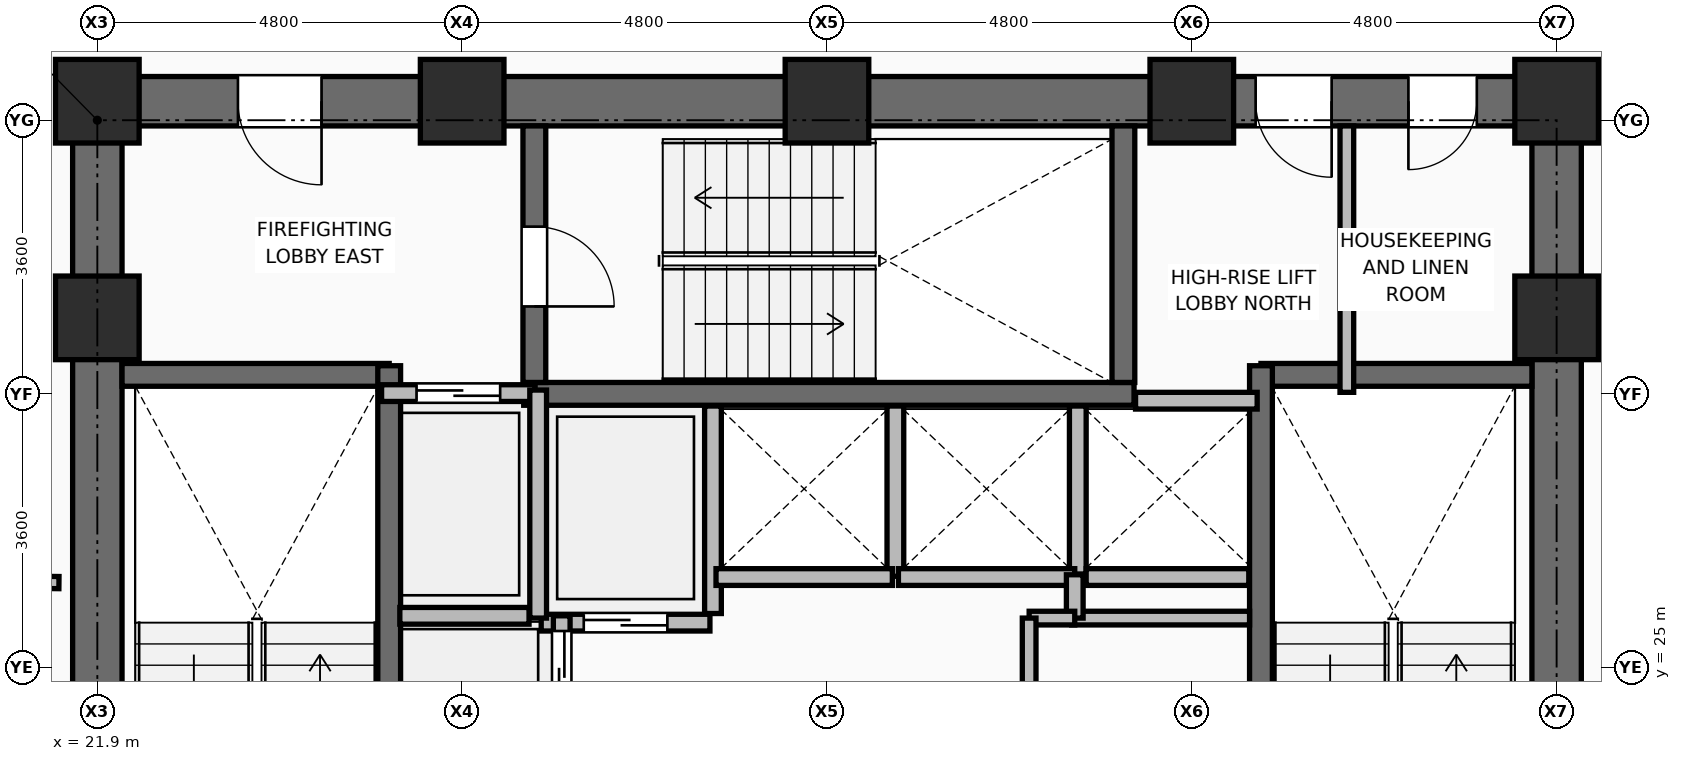
"""IFC4 building model, lengths in metres.
Left out: names, types, materials, properties, quantities, classifications, styles, units other than length and angle.
Written with IfcOpenShell. Run it as: python <this file> out.ifc"""

import sys

from ifc_helpers import new_model, si_unit, direction, frame, frame_2d, origin, origin_2d, place, context, subcontext, project, spatial, rectangle, extrude, element, fill, save


model = new_model("IFC4")
c1 = context("Model", 3, precision=1e-05, world=origin(), true_north=direction((0.0, 1.0)))
c2 = subcontext(c1, "Body", "Model", "MODEL_VIEW")
j1 = project(units=[si_unit("LENGTHUNIT", "METRE"), si_unit("PLANEANGLEUNIT", "RADIAN")], contexts=[c1])
p1 = place(None, origin())
s1 = spatial("IfcSite", under=j1, at=p1, CompositionType="ELEMENT")
p2 = place(p1, origin())
s2 = spatial("IfcBuilding", under=s1, at=p2, CompositionType="ELEMENT")
p3 = place(p2, frame((0.0, 0.0, 72.0)))
s3 = spatial("IfcBuildingStorey", under=s2, at=p3, CompositionType="ELEMENT", Elevation=72.0)
for number, where, z_axis, x_axis in (
    (1, (21.9, 29.6, 0.0), (0.0, 0.0, 1.0), (1.0, 0.0, 0.0)),
    (2, (41.1, 29.6, 0.0), (0.0, 0.0, 1.0), (1.0, 0.0, 0.0)),
    (3, (21.9, 32.45, 0.0), (0.0, 0.0, 1.0), (1.0, 0.0, 0.0)),
    (4, (26.7, 32.45, 0.0), (0.0, 0.0, 1.0), (1.0, 0.0, 0.0)),
    (5, (31.5, 32.45, 0.0), (0.0, 0.0, 1.0), (1.0, 0.0, 0.0)),
    (6, (36.3, 32.45, 0.0), (0.0, 0.0, 1.0), (1.0, 0.0, 0.0)),
    (7, (41.1, 32.45, 0.0), (0.0, 0.0, 1.0), (1.0, 0.0, 0.0)),
):
    element("IfcColumn", number, at=place(p3, frame(where, z_axis=z_axis, x_axis=x_axis)), inside=s3, PredefinedType="COLUMN", context=c2, shape_type="SweptSolid", body=[
        extrude(rectangle(XDim=1.1, YDim=1.1, at=origin_2d()), origin(), (0.0, 0.0, 1.0), 3.75),
    ])
p4 = place(p3, frame((30.0, 25.71, 0.0), z_axis=(0.0, 0.0, 1.0), x_axis=(0.0, 1.0, 0.0)))
e8 = element("IfcWall", 8, at=p4, inside=s3, PredefinedType="PARTITIONING", context=c2, shape_type="SweptSolid", body=[
    extrude(rectangle(XDim=2.73, YDim=0.22, at=frame_2d((1.365, 0.0))), origin(), (0.0, 0.0, 1.0), 3.545),
])
p5 = place(p3, frame((32.4, 26.2, 0.0), z_axis=(0.0, 0.0, 1.0), x_axis=(0.0, 1.0, 0.0)))
e9 = element("IfcWall", 9, at=p5, inside=s3, PredefinedType="PARTITIONING", context=c2, shape_type="SweptSolid", body=[
    extrude(rectangle(XDim=2.24, YDim=0.22, at=frame_2d((1.12, 0.0))), origin(), (0.0, 0.0, 1.0), 3.545),
])
p6 = place(p3, frame((34.8, 26.23, 0.0), z_axis=(0.0, 0.0, 1.0), x_axis=(0.0, 1.0, 0.0)))
e10 = element("IfcWall", 10, at=p6, inside=s3, PredefinedType="PARTITIONING", context=c2, shape_type="SweptSolid", body=[
    extrude(rectangle(XDim=2.21, YDim=0.22, at=frame_2d((1.105, 0.0))), origin(), (0.0, 0.0, 1.0), 3.545),
])
p7 = place(p3, frame((34.91, 26.19, 0.0), z_axis=(0.0, 0.0, 1.0), x_axis=(1.0, 0.0, 0.0)))
e11 = element("IfcWall", 11, at=p7, inside=s3, PredefinedType="PARTITIONING", context=c2, shape_type="SweptSolid", body=[
    extrude(rectangle(XDim=2.14, YDim=0.22, at=frame_2d((1.07, 0.0))), origin(), (0.0, 0.0, 1.0), 3.545),
])
p8 = place(p3, frame((21.575, 32.45, 0.0), z_axis=(0.0, 0.0, 1.0), x_axis=(1.0, 0.0, 0.0)))
e12 = element("IfcWall", 12, at=p8, inside=s3, PredefinedType="SHEAR", context=c2, shape_type="SweptSolid", body=[
    extrude(rectangle(XDim=19.85, YDim=0.65, at=frame_2d((9.925, 0.0))), origin(), (0.0, 0.0, 1.0), 3.57),
])
p9 = place(p8, frame((2.175, 0.0, 0.0)))
e13 = element("IfcOpeningElement", 13, at=p9, cuts=e12, PredefinedType="OPENING", context=c2, shape_type="SweptSolid", body=[
    extrude(rectangle(XDim=1.1, YDim=2.1, at=frame_2d((0.55, 1.05))), frame((0.0, 0.335, 0.0), z_axis=(0.0, -1.0, 0.0), x_axis=(1.0, 0.0, 0.0)), (0.0, 0.0, 1.0), 0.67),
])
p10 = place(p8, frame((15.565, 0.0, 0.0)))
e14 = element("IfcOpeningElement", 14, at=p10, cuts=e12, PredefinedType="OPENING", context=c2, shape_type="SweptSolid", body=[
    extrude(rectangle(XDim=1.0, YDim=2.1, at=frame_2d((0.5, 1.05))), frame((0.0, 0.335, 0.0), z_axis=(0.0, -1.0, 0.0), x_axis=(1.0, 0.0, 0.0)), (0.0, 0.0, 1.0), 0.67),
])
p11 = place(p8, frame((17.575, 0.0, 0.0)))
e15 = element("IfcOpeningElement", 15, at=p11, cuts=e12, PredefinedType="OPENING", context=c2, shape_type="SweptSolid", body=[
    extrude(rectangle(XDim=0.9, YDim=2.1, at=frame_2d((0.45, 1.05))), frame((0.0, 0.335, 0.0), z_axis=(0.0, -1.0, 0.0), x_axis=(1.0, 0.0, 0.0)), (0.0, 0.0, 1.0), 0.67),
])
p12 = place(p3, frame((21.9, 18.125, 0.0), z_axis=(0.0, 0.0, 1.0), x_axis=(0.0, 1.0, 0.0)))
e16 = element("IfcWall", 16, at=p12, inside=s3, PredefinedType="SHEAR", context=c2, shape_type="SweptSolid", body=[
    extrude(rectangle(XDim=14.0, YDim=0.65, at=frame_2d((7.0, 0.0))), origin(), (0.0, 0.0, 1.0), 3.57),
])
p13 = place(p3, frame((41.1, 18.125, 0.0), z_axis=(0.0, 0.0, 1.0), x_axis=(0.0, 1.0, 0.0)))
e17 = element("IfcWall", 17, at=p13, inside=s3, PredefinedType="SHEAR", context=c2, shape_type="SweptSolid", body=[
    extrude(rectangle(XDim=14.0, YDim=0.65, at=frame_2d((7.0, 0.0))), origin(), (0.0, 0.0, 1.0), 3.57),
])
p14 = place(p13, frame((3.335, 0.0, 0.0)))
e18 = element("IfcOpeningElement", 18, at=p14, cuts=e17, PredefinedType="OPENING", context=c2, shape_type="SweptSolid", body=[
    extrude(rectangle(XDim=1.05, YDim=2.1, at=frame_2d((0.525, 1.05))), frame((0.0, 0.335, 0.0), z_axis=(0.0, -1.0, 0.0), x_axis=(1.0, 0.0, 0.0)), (0.0, 0.0, 1.0), 0.67),
])
p15 = place(p3, frame((22.225, 28.85, 0.0), z_axis=(0.0, 0.0, 1.0), x_axis=(1.0, 0.0, 0.0)))
e19 = element("IfcWall", 19, at=p15, inside=s3, PredefinedType="SHEAR", context=c2, shape_type="SweptSolid", body=[
    extrude(rectangle(XDim=3.515, YDim=0.3, at=frame_2d((1.757, 0.0))), origin(), (0.0, 0.0, 1.0), 3.57),
])
p16 = place(p3, frame((25.74, 20.98, 0.0), z_axis=(0.0, 0.0, 1.0), x_axis=(0.0, 1.0, 0.0)))
e20 = element("IfcWall", 20, at=p16, inside=s3, PredefinedType="SHEAR", context=c2, shape_type="SweptSolid", body=[
    extrude(rectangle(XDim=7.99, YDim=0.3, at=frame_2d((3.995, 0.0))), origin(), (0.0, 0.0, 1.0), 3.57),
])
p17 = place(p3, frame((37.21, 28.85, 0.0), z_axis=(0.0, 0.0, 1.0), x_axis=(1.0, 0.0, 0.0)))
e21 = element("IfcWall", 21, at=p17, inside=s3, PredefinedType="SHEAR", context=c2, shape_type="SweptSolid", body=[
    extrude(rectangle(XDim=3.565, YDim=0.3, at=frame_2d((1.782, 0.0))), origin(), (0.0, 0.0, 1.0), 3.57),
])
p18 = place(p3, frame((37.21, 20.98, 0.0), z_axis=(0.0, 0.0, 1.0), x_axis=(0.0, 1.0, 0.0)))
e22 = element("IfcWall", 22, at=p18, inside=s3, PredefinedType="SHEAR", context=c2, shape_type="SweptSolid", body=[
    extrude(rectangle(XDim=7.99, YDim=0.3, at=frame_2d((3.995, 0.0))), origin(), (0.0, 0.0, 1.0), 3.57),
])
p19 = place(p3, frame((27.51, 28.6, 0.0), z_axis=(0.0, 0.0, 1.0), x_axis=(1.0, 0.0, 0.0)))
e23 = element("IfcWall", 23, at=p19, inside=s3, PredefinedType="SHEAR", context=c2, shape_type="SweptSolid", body=[
    extrude(rectangle(XDim=8.03, YDim=0.3, at=frame_2d((4.015, 0.0))), origin(), (0.0, 0.0, 1.0), 3.57),
])
p20 = place(p3, frame((27.65, 28.75, 0.0), z_axis=(0.0, 0.0, 1.0), x_axis=(0.0, 1.0, 0.0)))
e24 = element("IfcWall", 24, at=p20, inside=s3, PredefinedType="SHEAR", context=c2, shape_type="SweptSolid", body=[
    extrude(rectangle(XDim=3.375, YDim=0.3, at=frame_2d((1.688, 0.0))), origin(), (0.0, 0.0, 1.0), 3.57),
])
p21 = place(p20, frame((1.0, 0.0, 0.0)))
e25 = element("IfcOpeningElement", 25, at=p21, cuts=e24, PredefinedType="OPENING", context=c2, shape_type="SweptSolid", body=[
    extrude(rectangle(XDim=1.05, YDim=2.1, at=frame_2d((0.525, 1.05))), frame((0.0, 0.16, 0.0), z_axis=(0.0, -1.0, 0.0), x_axis=(1.0, 0.0, 0.0)), (0.0, 0.0, 1.0), 0.32),
])
p22 = place(p3, frame((35.4, 28.75, 0.0), z_axis=(0.0, 0.0, 1.0), x_axis=(0.0, 1.0, 0.0)))
e26 = element("IfcWall", 26, at=p22, inside=s3, PredefinedType="SHEAR", context=c2, shape_type="SweptSolid", body=[
    extrude(rectangle(XDim=3.375, YDim=0.3, at=frame_2d((1.688, 0.0))), origin(), (0.0, 0.0, 1.0), 3.57),
])
p23 = place(p3, frame((25.64, 28.61, 0.0), z_axis=(0.0, 0.0, 1.0), x_axis=(1.0, 0.0, 0.0)))
e27 = element("IfcWall", 27, at=p23, inside=s3, PredefinedType="PARTITIONING", context=c2, shape_type="SweptSolid", body=[
    extrude(rectangle(XDim=2.02, YDim=0.22, at=frame_2d((1.01, 0.0))), origin(), (0.0, 0.0, 1.0), 3.55),
])
p24 = place(p23, frame((0.46, 0.0, 0.0)))
e28 = element("IfcOpeningElement", 28, at=p24, cuts=e27, PredefinedType="OPENING", context=c2, shape_type="SweptSolid", body=[
    extrude(rectangle(XDim=1.1, YDim=2.2, at=frame_2d((0.55, 1.1))), frame((0.0, 0.12, 0.0), z_axis=(0.0, -1.0, 0.0), x_axis=(1.0, 0.0, 0.0)), (0.0, 0.0, 1.0), 0.24),
])
p25 = place(p3, frame((27.74, 25.59, 0.0), z_axis=(0.0, 0.0, 1.0), x_axis=(1.0, 0.0, 0.0)))
e29 = element("IfcWall", 29, at=p25, inside=s3, PredefinedType="PARTITIONING", context=c2, shape_type="SweptSolid", body=[
    extrude(rectangle(XDim=2.22, YDim=0.22, at=frame_2d((1.11, 0.0))), origin(), (0.0, 0.0, 1.0), 3.55),
])
p26 = place(p25, frame((0.56, 0.0, 0.0)))
e30 = element("IfcOpeningElement", 30, at=p26, cuts=e29, PredefinedType="OPENING", context=c2, shape_type="SweptSolid", body=[
    extrude(rectangle(XDim=1.1, YDim=2.2, at=frame_2d((0.55, 1.1))), frame((0.0, 0.12, 0.0), z_axis=(0.0, -1.0, 0.0), x_axis=(1.0, 0.0, 0.0)), (0.0, 0.0, 1.0), 0.24),
])
for number, where, z_axis, x_axis in (
    (31, (30.04, 26.19, 0.0), (0.0, 0.0, 1.0), (1.0, 0.0, 0.0)),
    (32, (32.44, 26.19, 0.0), (0.0, 0.0, 1.0), (1.0, 0.0, 0.0)),
):
    element("IfcWall", number, at=place(p3, frame(where, z_axis=z_axis, x_axis=x_axis)), inside=s3, PredefinedType="PARTITIONING", context=c2, shape_type="SweptSolid", body=[
        extrude(rectangle(XDim=2.32, YDim=0.22, at=frame_2d((1.16, 0.0))), origin(), (0.0, 0.0, 1.0), 3.55),
    ])
p27 = place(p3, frame((35.56, 28.51, 0.0), z_axis=(0.0, 0.0, 1.0), x_axis=(1.0, 0.0, 0.0)))
e33 = element("IfcWall", 33, at=p27, inside=s3, PredefinedType="PARTITIONING", context=c2, shape_type="SweptSolid", body=[
    extrude(rectangle(XDim=1.6, YDim=0.22, at=frame_2d((0.8, 0.0))), origin(), (0.0, 0.0, 1.0), 3.55),
])
p28 = place(p3, frame((28.01, 24.18, 0.0), z_axis=(0.0, 0.0, 1.0), x_axis=(0.0, 1.0, 0.0)))
e34 = element("IfcWall", 34, at=p28, inside=s3, PredefinedType="PARTITIONING", context=c2, shape_type="SweptSolid", body=[
    extrude(rectangle(XDim=1.5, YDim=0.22, at=frame_2d((0.75, 0.0))), origin(), (0.0, 0.0, 1.0), 3.55),
])
p29 = place(p28, frame((0.2, 0.0, 0.0)))
e35 = element("IfcOpeningElement", 35, at=p29, cuts=e34, PredefinedType="OPENING", context=c2, shape_type="SweptSolid", body=[
    extrude(rectangle(XDim=1.1, YDim=2.2, at=frame_2d((0.55, 1.1))), frame((0.0, 0.12, 0.0), z_axis=(0.0, -1.0, 0.0), x_axis=(1.0, 0.0, 0.0)), (0.0, 0.0, 1.0), 0.24),
])
p30 = place(p3, frame((27.7, 25.65, 0.0), z_axis=(0.0, 0.0, 1.0), x_axis=(0.0, 1.0, 0.0)))
e36 = element("IfcWall", 36, at=p30, inside=s3, PredefinedType="PARTITIONING", context=c2, shape_type="SweptSolid", body=[
    extrude(rectangle(XDim=3.0, YDim=0.22, at=frame_2d((1.5, 0.0))), origin(), (0.0, 0.0, 1.0), 3.55),
])
p31 = place(p3, frame((25.88, 25.68, 0.0), z_axis=(0.0, 0.0, 1.0), x_axis=(1.0, 0.0, 0.0)))
e37 = element("IfcWall", 37, at=p31, inside=s3, PredefinedType="PARTITIONING", context=c2, shape_type="SweptSolid", body=[
    extrude(rectangle(XDim=1.7, YDim=0.22, at=frame_2d((0.85, 0.0))), origin(), (0.0, 0.0, 1.0), 3.55),
])
p32 = place(p3, frame((34.72, 25.65, 0.0), z_axis=(0.0, 0.0, 1.0), x_axis=(1.0, 0.0, 0.0)))
e38 = element("IfcWall", 38, at=p32, inside=s3, PredefinedType="PARTITIONING", context=c2, shape_type="SweptSolid", body=[
    extrude(rectangle(XDim=2.34, YDim=0.18, at=frame_2d((1.17, 0.0))), origin(), (0.0, 0.0, 1.0), 3.55),
])
p33 = place(p3, frame((34.76, 25.65, 0.0), z_axis=(0.0, 0.0, 1.0), x_axis=(0.0, 1.0, 0.0)))
e39 = element("IfcWall", 39, at=p33, inside=s3, PredefinedType="PARTITIONING", context=c2, shape_type="SweptSolid", body=[
    extrude(rectangle(XDim=0.57, YDim=0.22, at=frame_2d((0.285, 0.0))), origin(), (0.0, 0.0, 1.0), 3.55),
])
p34 = place(p3, frame((34.16, 25.65, 0.0), z_axis=(0.0, 0.0, 1.0), x_axis=(1.0, 0.0, 0.0)))
e40 = element("IfcWall", 40, at=p34, inside=s3, PredefinedType="PARTITIONING", context=c2, shape_type="SweptSolid", body=[
    extrude(rectangle(XDim=0.6, YDim=0.18, at=frame_2d((0.3, 0.0))), origin(), (0.0, 0.0, 1.0), 3.55),
])
p35 = place(p3, frame((34.16, 21.1, 0.0), z_axis=(0.0, 0.0, 1.0), x_axis=(0.0, 1.0, 0.0)))
e41 = element("IfcWall", 41, at=p35, inside=s3, PredefinedType="PARTITIONING", context=c2, shape_type="SweptSolid", body=[
    extrude(rectangle(XDim=4.55, YDim=0.18, at=frame_2d((2.275, 0.0))), origin(), (0.0, 0.0, 1.0), 3.55),
])
p36 = place(p35, frame((1.825, 0.0, 0.0)))
e42 = element("IfcOpeningElement", 42, at=p36, cuts=e41, PredefinedType="OPENING", context=c2, shape_type="SweptSolid", body=[
    extrude(rectangle(XDim=0.9, YDim=2.1, at=frame_2d((0.45, 1.05))), frame((0.0, 0.1, 0.0), z_axis=(0.0, -1.0, 0.0), x_axis=(1.0, 0.0, 0.0)), (0.0, 0.0, 1.0), 0.2),
])
p37 = place(p3, frame((38.34, 28.62, 0.0), z_axis=(0.0, 0.0, 1.0), x_axis=(0.0, 1.0, 0.0)))
e43 = element("IfcWall", 43, at=p37, inside=s3, PredefinedType="PARTITIONING", context=c2, shape_type="SweptSolid", body=[
    extrude(rectangle(XDim=3.505, YDim=0.18, at=frame_2d((1.752, 0.0))), origin(), (0.0, 0.0, 1.0), 3.55),
])
p38 = place(p3, frame((21.395, 26.117, 0.0), z_axis=(0.0, 0.0, 1.0), x_axis=(-0.999934504226, 0.011444966545, 0.0)))
e44 = element("IfcWall", 44, at=p38, inside=s3, PredefinedType="PARTITIONING", context=c2, shape_type="SweptSolid", body=[
    extrude(rectangle(XDim=2.197, YDim=0.16, at=frame_2d((1.099, 0.0))), origin(), (0.0, 0.0, 1.0), 3.55),
])
p39 = place(p21, frame((1.05, 0.0, 0.0), z_axis=(0.0, 0.0, 1.0), x_axis=(-1.0, 0.0, 0.0)))
e45 = element("IfcDoor", 45, at=p39, inside=s3, OperationType="SINGLE_SWING_RIGHT", PredefinedType="DOOR", context=c2, shape_type="SweptSolid", body=[
    extrude(rectangle(XDim=1.05, YDim=2.1, at=frame_2d((0.525, 1.05))), frame((0.0, 0.025, 0.0), z_axis=(0.0, -1.0, 0.0), x_axis=(1.0, 0.0, 0.0)), (0.0, 0.0, 1.0), 0.05),
])
fill(e25, e45)
p40 = place(p24, origin())
e46 = element("IfcDoor", 46, at=p40, inside=s3, OperationType="DOUBLE_DOOR_SLIDING", PredefinedType="DOOR", context=c2, shape_type="SweptSolid", body=[
    extrude(rectangle(XDim=1.1, YDim=2.2, at=frame_2d((0.55, 1.1))), frame((0.0, 0.025, 0.0), z_axis=(0.0, -1.0, 0.0), x_axis=(1.0, 0.0, 0.0)), (0.0, 0.0, 1.0), 0.05),
])
fill(e28, e46)
p41 = place(p26, frame((1.1, 0.0, 0.0), z_axis=(0.0, 0.0, 1.0), x_axis=(-1.0, 0.0, 0.0)))
e47 = element("IfcDoor", 47, at=p41, inside=s3, OperationType="DOUBLE_DOOR_SLIDING", PredefinedType="DOOR", context=c2, shape_type="SweptSolid", body=[
    extrude(rectangle(XDim=1.1, YDim=2.2, at=frame_2d((0.55, 1.1))), frame((0.0, 0.025, 0.0), z_axis=(0.0, -1.0, 0.0), x_axis=(1.0, 0.0, 0.0)), (0.0, 0.0, 1.0), 0.05),
])
fill(e30, e47)
p42 = place(p29, frame((1.1, 0.0, 0.0), z_axis=(0.0, 0.0, 1.0), x_axis=(-1.0, 0.0, 0.0)))
e48 = element("IfcDoor", 48, at=p42, inside=s3, OperationType="DOUBLE_DOOR_SLIDING", PredefinedType="DOOR", context=c2, shape_type="SweptSolid", body=[
    extrude(rectangle(XDim=1.1, YDim=2.2, at=frame_2d((0.55, 1.1))), frame((0.0, 0.025, 0.0), z_axis=(0.0, -1.0, 0.0), x_axis=(1.0, 0.0, 0.0)), (0.0, 0.0, 1.0), 0.05),
])
fill(e35, e48)
p43 = place(p9, frame((1.1, 0.0, 0.0), z_axis=(0.0, 0.0, 1.0), x_axis=(-1.0, 0.0, 0.0)))
e49 = element("IfcDoor", 49, at=p43, inside=s3, OperationType="SINGLE_SWING_LEFT", PredefinedType="DOOR", context=c2, shape_type="SweptSolid", body=[
    extrude(rectangle(XDim=1.1, YDim=2.1, at=frame_2d((0.55, 1.05))), frame((0.0, 0.025, 0.0), z_axis=(0.0, -1.0, 0.0), x_axis=(1.0, 0.0, 0.0)), (0.0, 0.0, 1.0), 0.05),
])
fill(e13, e49)
p44 = place(p10, frame((1.0, 0.0, 0.0), z_axis=(0.0, 0.0, 1.0), x_axis=(-1.0, 0.0, 0.0)))
e50 = element("IfcDoor", 50, at=p44, inside=s3, OperationType="SINGLE_SWING_LEFT", PredefinedType="DOOR", context=c2, shape_type="SweptSolid", body=[
    extrude(rectangle(XDim=1.0, YDim=2.1, at=frame_2d((0.5, 1.05))), frame((0.0, 0.025, 0.0), z_axis=(0.0, -1.0, 0.0), x_axis=(1.0, 0.0, 0.0)), (0.0, 0.0, 1.0), 0.05),
])
fill(e14, e50)
p45 = place(p11, frame((0.9, 0.0, 0.0), z_axis=(0.0, 0.0, 1.0), x_axis=(-1.0, 0.0, 0.0)))
e51 = element("IfcDoor", 51, at=p45, inside=s3, OperationType="SINGLE_SWING_RIGHT", PredefinedType="DOOR", context=c2, shape_type="SweptSolid", body=[
    extrude(rectangle(XDim=0.9, YDim=2.1, at=frame_2d((0.45, 1.05))), frame((0.0, 0.025, 0.0), z_axis=(0.0, -1.0, 0.0), x_axis=(1.0, 0.0, 0.0)), (0.0, 0.0, 1.0), 0.05),
])
fill(e15, e51)
save(model, sys.argv[1])
